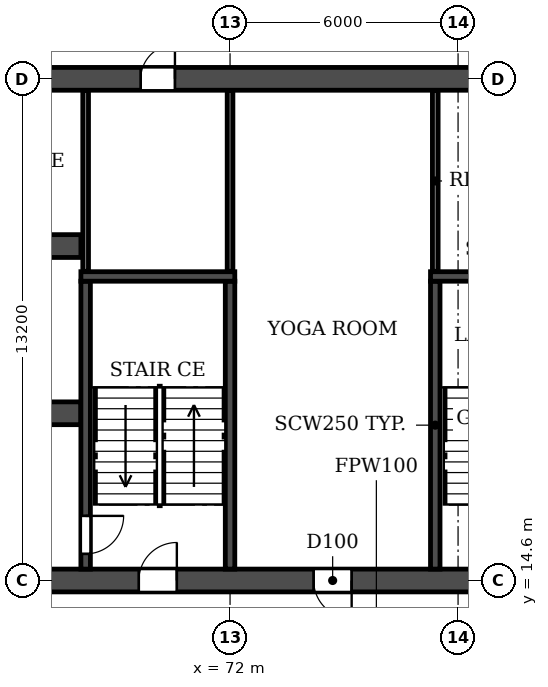
"""IFC4 building model, lengths in metres.
Left out: names, types, materials, properties, quantities, classifications, styles, units other than length and angle.
Written with IfcOpenShell. Run it as: python <this file> out.ifc"""

import sys

from ifc_helpers import new_model, si_unit, direction, frame, frame_2d, origin, place, context, subcontext, project, spatial, rectangle, extrude, element, fill, save


model = new_model("IFC4")
c1 = context("Model", 3, precision=1e-05, world=origin(), true_north=direction((0.0, 1.0)))
c2 = subcontext(c1, "Body", "Model", "MODEL_VIEW")
j1 = project(units=[si_unit("LENGTHUNIT", "METRE"), si_unit("PLANEANGLEUNIT", "RADIAN")], contexts=[c1])
p1 = place(None, origin())
s1 = spatial("IfcSite", under=j1, at=p1, CompositionType="ELEMENT")
p2 = place(p1, origin())
s2 = spatial("IfcBuilding", under=s1, at=p2, CompositionType="ELEMENT")
p3 = place(p2, frame((0.0, 0.0, 43.2)))
s3 = spatial("IfcBuildingStorey", under=s2, at=p3, CompositionType="ELEMENT", Elevation=43.2)
p4 = place(p3, frame((2.6, 14.6, 0.0), z_axis=(0.0, 0.0, 1.0), x_axis=(1.0, 0.0, 0.0)))
e1 = element("IfcWall", 1, at=p4, inside=s3, PredefinedType="SOLIDWALL", context=c2, shape_type="SweptSolid", body=[
    extrude(rectangle(XDim=96.8, YDim=0.6, at=frame_2d((48.4, 0.0))), origin(), (0.0, 0.0, 1.0), 3.05),
])
p5 = place(p4, frame((3.05, 0.0, 0.0)))
e2 = element("IfcOpeningElement", 2, at=p5, cuts=e1, PredefinedType="OPENING", context=c2, shape_type="SweptSolid", body=[
    extrude(rectangle(XDim=1.5, YDim=2.1, at=frame_2d((0.75, 1.05))), frame((0.0, 0.31, 0.0), z_axis=(0.0, -1.0, 0.0), x_axis=(1.0, 0.0, 0.0)), (0.0, 0.0, 1.0), 0.62),
])
p6 = place(p4, frame((10.75, 0.0, 0.0)))
e3 = element("IfcOpeningElement", 3, at=p6, cuts=e1, PredefinedType="OPENING", context=c2, shape_type="SweptSolid", body=[
    extrude(rectangle(XDim=1.5, YDim=2.1, at=frame_2d((0.75, 1.05))), frame((0.0, 0.31, 0.0), z_axis=(0.0, -1.0, 0.0), x_axis=(1.0, 0.0, 0.0)), (0.0, 0.0, 1.0), 0.62),
])
p7 = place(p4, frame((16.3, 0.0, 0.0)))
e4 = element("IfcOpeningElement", 4, at=p7, cuts=e1, PredefinedType="OPENING", context=c2, shape_type="SweptSolid", body=[
    extrude(rectangle(XDim=1.0, YDim=2.1, at=frame_2d((0.5, 1.05))), frame((0.0, 0.31, 0.0), z_axis=(0.0, -1.0, 0.0), x_axis=(1.0, 0.0, 0.0)), (0.0, 0.0, 1.0), 0.62),
])
p8 = place(p4, frame((24.2, 0.0, 0.0)))
e5 = element("IfcOpeningElement", 5, at=p8, cuts=e1, PredefinedType="OPENING", context=c2, shape_type="SweptSolid", body=[
    extrude(rectangle(XDim=1.0, YDim=2.1, at=frame_2d((0.5, 1.05))), frame((0.0, 0.31, 0.0), z_axis=(0.0, -1.0, 0.0), x_axis=(1.0, 0.0, 0.0)), (0.0, 0.0, 1.0), 0.62),
])
p9 = place(p4, frame((28.8, 0.0, 0.0)))
e6 = element("IfcOpeningElement", 6, at=p9, cuts=e1, PredefinedType="OPENING", context=c2, shape_type="SweptSolid", body=[
    extrude(rectangle(XDim=1.0, YDim=2.1, at=frame_2d((0.5, 1.05))), frame((0.0, 0.31, 0.0), z_axis=(0.0, -1.0, 0.0), x_axis=(1.0, 0.0, 0.0)), (0.0, 0.0, 1.0), 0.62),
])
p10 = place(p4, frame((42.7, 0.0, 0.0)))
e7 = element("IfcOpeningElement", 7, at=p10, cuts=e1, PredefinedType="OPENING", context=c2, shape_type="SweptSolid", body=[
    extrude(rectangle(XDim=1.0, YDim=2.1, at=frame_2d((0.5, 1.05))), frame((0.0, 0.31, 0.0), z_axis=(0.0, -1.0, 0.0), x_axis=(1.0, 0.0, 0.0)), (0.0, 0.0, 1.0), 0.62),
])
p11 = place(p4, frame((47.9, 0.0, 0.0)))
e8 = element("IfcOpeningElement", 8, at=p11, cuts=e1, PredefinedType="OPENING", context=c2, shape_type="SweptSolid", body=[
    extrude(rectangle(XDim=1.0, YDim=2.1, at=frame_2d((0.5, 1.05))), frame((0.0, 0.31, 0.0), z_axis=(0.0, -1.0, 0.0), x_axis=(1.0, 0.0, 0.0)), (0.0, 0.0, 1.0), 0.62),
])
p12 = place(p4, frame((51.8, 0.0, 0.0)))
e9 = element("IfcOpeningElement", 9, at=p12, cuts=e1, PredefinedType="OPENING", context=c2, shape_type="SweptSolid", body=[
    extrude(rectangle(XDim=1.0, YDim=2.1, at=frame_2d((0.5, 1.05))), frame((0.0, 0.31, 0.0), z_axis=(0.0, -1.0, 0.0), x_axis=(1.0, 0.0, 0.0)), (0.0, 0.0, 1.0), 0.62),
])
p13 = place(p4, frame((55.7, 0.0, 0.0)))
e10 = element("IfcOpeningElement", 10, at=p13, cuts=e1, PredefinedType="OPENING", context=c2, shape_type="SweptSolid", body=[
    extrude(rectangle(XDim=1.0, YDim=2.1, at=frame_2d((0.5, 1.05))), frame((0.0, 0.31, 0.0), z_axis=(0.0, -1.0, 0.0), x_axis=(1.0, 0.0, 0.0)), (0.0, 0.0, 1.0), 0.62),
])
p14 = place(p4, frame((67.0, 0.0, 0.0)))
e11 = element("IfcOpeningElement", 11, at=p14, cuts=e1, PredefinedType="OPENING", context=c2, shape_type="SweptSolid", body=[
    extrude(rectangle(XDim=1.0, YDim=2.1, at=frame_2d((0.5, 1.05))), frame((0.0, 0.31, 0.0), z_axis=(0.0, -1.0, 0.0), x_axis=(1.0, 0.0, 0.0)), (0.0, 0.0, 1.0), 0.62),
])
p15 = place(p4, frame((71.6, 0.0, 0.0)))
e12 = element("IfcOpeningElement", 12, at=p15, cuts=e1, PredefinedType="OPENING", context=c2, shape_type="SweptSolid", body=[
    extrude(rectangle(XDim=1.0, YDim=2.1, at=frame_2d((0.5, 1.05))), frame((0.0, 0.31, 0.0), z_axis=(0.0, -1.0, 0.0), x_axis=(1.0, 0.0, 0.0)), (0.0, 0.0, 1.0), 0.62),
])
p16 = place(p4, frame((79.5, 0.0, 0.0)))
e13 = element("IfcOpeningElement", 13, at=p16, cuts=e1, PredefinedType="OPENING", context=c2, shape_type="SweptSolid", body=[
    extrude(rectangle(XDim=1.0, YDim=2.1, at=frame_2d((0.5, 1.05))), frame((0.0, 0.31, 0.0), z_axis=(0.0, -1.0, 0.0), x_axis=(1.0, 0.0, 0.0)), (0.0, 0.0, 1.0), 0.62),
])
p17 = place(p4, frame((84.05, 0.0, 0.0)))
e14 = element("IfcOpeningElement", 14, at=p17, cuts=e1, PredefinedType="OPENING", context=c2, shape_type="SweptSolid", body=[
    extrude(rectangle(XDim=1.0, YDim=2.1, at=frame_2d((0.5, 1.05))), frame((0.0, 0.31, 0.0), z_axis=(0.0, -1.0, 0.0), x_axis=(1.0, 0.0, 0.0)), (0.0, 0.0, 1.0), 0.62),
])
p18 = place(p4, frame((91.75, 0.0, 0.0)))
e15 = element("IfcOpeningElement", 15, at=p18, cuts=e1, PredefinedType="OPENING", context=c2, shape_type="SweptSolid", body=[
    extrude(rectangle(XDim=1.0, YDim=2.1, at=frame_2d((0.5, 1.05))), frame((0.0, 0.31, 0.0), z_axis=(0.0, -1.0, 0.0), x_axis=(1.0, 0.0, 0.0)), (0.0, 0.0, 1.0), 0.62),
])
p19 = place(p3, frame((2.6, 27.8, 0.0), z_axis=(0.0, 0.0, 1.0), x_axis=(1.0, 0.0, 0.0)))
e16 = element("IfcWall", 16, at=p19, inside=s3, PredefinedType="SOLIDWALL", context=c2, shape_type="SweptSolid", body=[
    extrude(rectangle(XDim=96.8, YDim=0.6, at=frame_2d((48.4, 0.0))), origin(), (0.0, 0.0, 1.0), 3.05),
])
p20 = place(p19, frame((7.2, 0.0, 0.0)))
e17 = element("IfcOpeningElement", 17, at=p20, cuts=e16, PredefinedType="OPENING", context=c2, shape_type="SweptSolid", body=[
    extrude(rectangle(XDim=1.0, YDim=2.1, at=frame_2d((0.5, 1.05))), frame((0.0, 0.31, 0.0), z_axis=(0.0, -1.0, 0.0), x_axis=(1.0, 0.0, 0.0)), (0.0, 0.0, 1.0), 0.62),
])
p21 = place(p19, frame((16.3, 0.0, 0.0)))
e18 = element("IfcOpeningElement", 18, at=p21, cuts=e16, PredefinedType="OPENING", context=c2, shape_type="SweptSolid", body=[
    extrude(rectangle(XDim=1.0, YDim=2.1, at=frame_2d((0.5, 1.05))), frame((0.0, 0.31, 0.0), z_axis=(0.0, -1.0, 0.0), x_axis=(1.0, 0.0, 0.0)), (0.0, 0.0, 1.0), 0.62),
])
p22 = place(p19, frame((19.65, 0.0, 0.0)))
e19 = element("IfcOpeningElement", 19, at=p22, cuts=e16, PredefinedType="OPENING", context=c2, shape_type="SweptSolid", body=[
    extrude(rectangle(XDim=0.9, YDim=2.1, at=frame_2d((0.45, 1.05))), frame((0.0, 0.31, 0.0), z_axis=(0.0, -1.0, 0.0), x_axis=(1.0, 0.0, 0.0)), (0.0, 0.0, 1.0), 0.62),
])
p23 = place(p19, frame((28.85, 0.0, 0.0)))
e20 = element("IfcOpeningElement", 20, at=p23, cuts=e16, PredefinedType="OPENING", context=c2, shape_type="SweptSolid", body=[
    extrude(rectangle(XDim=0.9, YDim=2.1, at=frame_2d((0.45, 1.05))), frame((0.0, 0.31, 0.0), z_axis=(0.0, -1.0, 0.0), x_axis=(1.0, 0.0, 0.0)), (0.0, 0.0, 1.0), 0.62),
])
p24 = place(p19, frame((33.3, 0.0, 0.0)))
e21 = element("IfcOpeningElement", 21, at=p24, cuts=e16, PredefinedType="OPENING", context=c2, shape_type="SweptSolid", body=[
    extrude(rectangle(XDim=1.0, YDim=2.1, at=frame_2d((0.5, 1.05))), frame((0.0, 0.31, 0.0), z_axis=(0.0, -1.0, 0.0), x_axis=(1.0, 0.0, 0.0)), (0.0, 0.0, 1.0), 0.62),
])
p25 = place(p19, frame((38.25, 0.0, 0.0)))
e22 = element("IfcOpeningElement", 22, at=p25, cuts=e16, PredefinedType="OPENING", context=c2, shape_type="SweptSolid", body=[
    extrude(rectangle(XDim=1.5, YDim=2.1, at=frame_2d((0.75, 1.05))), frame((0.0, 0.31, 0.0), z_axis=(0.0, -1.0, 0.0), x_axis=(1.0, 0.0, 0.0)), (0.0, 0.0, 1.0), 0.62),
])
p26 = place(p19, frame((45.0, 0.0, 0.0)))
e23 = element("IfcOpeningElement", 23, at=p26, cuts=e16, PredefinedType="OPENING", context=c2, shape_type="SweptSolid", body=[
    extrude(rectangle(XDim=1.0, YDim=2.1, at=frame_2d((0.5, 1.05))), frame((0.0, 0.31, 0.0), z_axis=(0.0, -1.0, 0.0), x_axis=(1.0, 0.0, 0.0)), (0.0, 0.0, 1.0), 0.62),
])
p27 = place(p19, frame((47.9, 0.0, 0.0)))
e24 = element("IfcOpeningElement", 24, at=p27, cuts=e16, PredefinedType="OPENING", context=c2, shape_type="SweptSolid", body=[
    extrude(rectangle(XDim=1.0, YDim=2.1, at=frame_2d((0.5, 1.05))), frame((0.0, 0.31, 0.0), z_axis=(0.0, -1.0, 0.0), x_axis=(1.0, 0.0, 0.0)), (0.0, 0.0, 1.0), 0.62),
])
p28 = place(p19, frame((52.1, 0.0, 0.0)))
e25 = element("IfcOpeningElement", 25, at=p28, cuts=e16, PredefinedType="OPENING", context=c2, shape_type="SweptSolid", body=[
    extrude(rectangle(XDim=1.0, YDim=2.1, at=frame_2d((0.5, 1.05))), frame((0.0, 0.31, 0.0), z_axis=(0.0, -1.0, 0.0), x_axis=(1.0, 0.0, 0.0)), (0.0, 0.0, 1.0), 0.62),
])
p29 = place(p19, frame((56.0, 0.0, 0.0)))
e26 = element("IfcOpeningElement", 26, at=p29, cuts=e16, PredefinedType="OPENING", context=c2, shape_type="SweptSolid", body=[
    extrude(rectangle(XDim=1.0, YDim=2.1, at=frame_2d((0.5, 1.05))), frame((0.0, 0.31, 0.0), z_axis=(0.0, -1.0, 0.0), x_axis=(1.0, 0.0, 0.0)), (0.0, 0.0, 1.0), 0.62),
])
p30 = place(p19, frame((61.2, 0.0, 0.0)))
e27 = element("IfcOpeningElement", 27, at=p30, cuts=e16, PredefinedType="OPENING", context=c2, shape_type="SweptSolid", body=[
    extrude(rectangle(XDim=1.0, YDim=2.1, at=frame_2d((0.5, 1.05))), frame((0.0, 0.31, 0.0), z_axis=(0.0, -1.0, 0.0), x_axis=(1.0, 0.0, 0.0)), (0.0, 0.0, 1.0), 0.62),
])
p31 = place(p19, frame((67.05, 0.0, 0.0)))
e28 = element("IfcOpeningElement", 28, at=p31, cuts=e16, PredefinedType="OPENING", context=c2, shape_type="SweptSolid", body=[
    extrude(rectangle(XDim=0.9, YDim=2.1, at=frame_2d((0.45, 1.05))), frame((0.0, 0.31, 0.0), z_axis=(0.0, -1.0, 0.0), x_axis=(1.0, 0.0, 0.0)), (0.0, 0.0, 1.0), 0.62),
])
p32 = place(p19, frame((76.25, 0.0, 0.0)))
e29 = element("IfcOpeningElement", 29, at=p32, cuts=e16, PredefinedType="OPENING", context=c2, shape_type="SweptSolid", body=[
    extrude(rectangle(XDim=0.9, YDim=2.1, at=frame_2d((0.45, 1.05))), frame((0.0, 0.31, 0.0), z_axis=(0.0, -1.0, 0.0), x_axis=(1.0, 0.0, 0.0)), (0.0, 0.0, 1.0), 0.62),
])
p33 = place(p19, frame((79.5, 0.0, 0.0)))
e30 = element("IfcOpeningElement", 30, at=p33, cuts=e16, PredefinedType="OPENING", context=c2, shape_type="SweptSolid", body=[
    extrude(rectangle(XDim=1.0, YDim=2.1, at=frame_2d((0.5, 1.05))), frame((0.0, 0.31, 0.0), z_axis=(0.0, -1.0, 0.0), x_axis=(1.0, 0.0, 0.0)), (0.0, 0.0, 1.0), 0.62),
])
p34 = place(p19, frame((84.05, 0.0, 0.0)))
e31 = element("IfcOpeningElement", 31, at=p34, cuts=e16, PredefinedType="OPENING", context=c2, shape_type="SweptSolid", body=[
    extrude(rectangle(XDim=1.0, YDim=2.1, at=frame_2d((0.5, 1.05))), frame((0.0, 0.31, 0.0), z_axis=(0.0, -1.0, 0.0), x_axis=(1.0, 0.0, 0.0)), (0.0, 0.0, 1.0), 0.62),
])
p35 = place(p19, frame((91.75, 0.0, 0.0)))
e32 = element("IfcOpeningElement", 32, at=p35, cuts=e16, PredefinedType="OPENING", context=c2, shape_type="SweptSolid", body=[
    extrude(rectangle(XDim=1.0, YDim=2.1, at=frame_2d((0.5, 1.05))), frame((0.0, 0.31, 0.0), z_axis=(0.0, -1.0, 0.0), x_axis=(1.0, 0.0, 0.0)), (0.0, 0.0, 1.0), 0.62),
])
p36 = place(p3, frame((33.925, 19.0, 0.0), z_axis=(0.0, 0.0, 1.0), x_axis=(1.0, 0.0, 0.0)))
e33 = element("IfcWall", 33, at=p36, inside=s3, PredefinedType="SOLIDWALL", context=c2, shape_type="SweptSolid", body=[
    extrude(rectangle(XDim=34.15, YDim=0.6, at=frame_2d((17.075, 0.0))), origin(), (0.0, 0.0, 1.0), 3.05),
])
p37 = place(p36, frame((16.175, 0.0, 0.0)))
e34 = element("IfcOpeningElement", 34, at=p37, cuts=e33, PredefinedType="OPENING", context=c2, shape_type="SweptSolid", body=[
    extrude(rectangle(XDim=1.8, YDim=2.1, at=frame_2d((0.9, 1.05))), frame((0.0, 0.31, 0.0), z_axis=(0.0, -1.0, 0.0), x_axis=(1.0, 0.0, 0.0)), (0.0, 0.0, 1.0), 0.62),
])
p38 = place(p36, frame((1.525, 0.0, 0.0)))
e35 = element("IfcOpeningElement", 35, at=p38, cuts=e33, PredefinedType="OPENING", context=c2, shape_type="SweptSolid", body=[
    extrude(rectangle(XDim=1.8, YDim=2.1, at=frame_2d((0.9, 1.05))), frame((0.0, 0.31, 0.0), z_axis=(0.0, -1.0, 0.0), x_axis=(1.0, 0.0, 0.0)), (0.0, 0.0, 1.0), 0.62),
])
p39 = place(p36, frame((8.725, 0.0, 0.0)))
e36 = element("IfcOpeningElement", 36, at=p39, cuts=e33, PredefinedType="OPENING", context=c2, shape_type="SweptSolid", body=[
    extrude(rectangle(XDim=1.1, YDim=2.1, at=frame_2d((0.55, 1.05))), frame((0.0, 0.31, 0.0), z_axis=(0.0, -1.0, 0.0), x_axis=(1.0, 0.0, 0.0)), (0.0, 0.0, 1.0), 0.62),
])
p40 = place(p36, frame((11.325, 0.0, 0.0)))
e37 = element("IfcOpeningElement", 37, at=p40, cuts=e33, PredefinedType="OPENING", context=c2, shape_type="SweptSolid", body=[
    extrude(rectangle(XDim=1.1, YDim=2.1, at=frame_2d((0.55, 1.05))), frame((0.0, 0.31, 0.0), z_axis=(0.0, -1.0, 0.0), x_axis=(1.0, 0.0, 0.0)), (0.0, 0.0, 1.0), 0.62),
])
p41 = place(p36, frame((13.925, 0.0, 0.0)))
e38 = element("IfcOpeningElement", 38, at=p41, cuts=e33, PredefinedType="OPENING", context=c2, shape_type="SweptSolid", body=[
    extrude(rectangle(XDim=1.1, YDim=2.1, at=frame_2d((0.55, 1.05))), frame((0.0, 0.31, 0.0), z_axis=(0.0, -1.0, 0.0), x_axis=(1.0, 0.0, 0.0)), (0.0, 0.0, 1.0), 0.62),
])
p42 = place(p36, frame((19.125, 0.0, 0.0)))
e39 = element("IfcOpeningElement", 39, at=p42, cuts=e33, PredefinedType="OPENING", context=c2, shape_type="SweptSolid", body=[
    extrude(rectangle(XDim=1.1, YDim=2.1, at=frame_2d((0.55, 1.05))), frame((0.0, 0.31, 0.0), z_axis=(0.0, -1.0, 0.0), x_axis=(1.0, 0.0, 0.0)), (0.0, 0.0, 1.0), 0.62),
])
p43 = place(p36, frame((21.725, 0.0, 0.0)))
e40 = element("IfcOpeningElement", 40, at=p43, cuts=e33, PredefinedType="OPENING", context=c2, shape_type="SweptSolid", body=[
    extrude(rectangle(XDim=1.1, YDim=2.1, at=frame_2d((0.55, 1.05))), frame((0.0, 0.31, 0.0), z_axis=(0.0, -1.0, 0.0), x_axis=(1.0, 0.0, 0.0)), (0.0, 0.0, 1.0), 0.62),
])
p44 = place(p36, frame((24.325, 0.0, 0.0)))
e41 = element("IfcOpeningElement", 41, at=p44, cuts=e33, PredefinedType="OPENING", context=c2, shape_type="SweptSolid", body=[
    extrude(rectangle(XDim=1.1, YDim=2.1, at=frame_2d((0.55, 1.05))), frame((0.0, 0.31, 0.0), z_axis=(0.0, -1.0, 0.0), x_axis=(1.0, 0.0, 0.0)), (0.0, 0.0, 1.0), 0.62),
])
p45 = place(p36, frame((30.825, 0.0, 0.0)))
e42 = element("IfcOpeningElement", 42, at=p45, cuts=e33, PredefinedType="OPENING", context=c2, shape_type="SweptSolid", body=[
    extrude(rectangle(XDim=1.8, YDim=2.1, at=frame_2d((0.9, 1.05))), frame((0.0, 0.31, 0.0), z_axis=(0.0, -1.0, 0.0), x_axis=(1.0, 0.0, 0.0)), (0.0, 0.0, 1.0), 0.62),
])
p46 = place(p3, frame((33.925, 23.4, 0.0), z_axis=(0.0, 0.0, 1.0), x_axis=(1.0, 0.0, 0.0)))
e43 = element("IfcWall", 43, at=p46, inside=s3, PredefinedType="SOLIDWALL", context=c2, shape_type="SweptSolid", body=[
    extrude(rectangle(XDim=34.15, YDim=0.6, at=frame_2d((17.075, 0.0))), origin(), (0.0, 0.0, 1.0), 3.05),
])
p47 = place(p46, frame((16.175, 0.0, 0.0)))
e44 = element("IfcOpeningElement", 44, at=p47, cuts=e43, PredefinedType="OPENING", context=c2, shape_type="SweptSolid", body=[
    extrude(rectangle(XDim=1.8, YDim=2.1, at=frame_2d((0.9, 1.05))), frame((0.0, 0.31, 0.0), z_axis=(0.0, -1.0, 0.0), x_axis=(1.0, 0.0, 0.0)), (0.0, 0.0, 1.0), 0.62),
])
p48 = place(p46, frame((11.025, 0.0, 0.0)))
e45 = element("IfcOpeningElement", 45, at=p48, cuts=e43, PredefinedType="OPENING", context=c2, shape_type="SweptSolid", body=[
    extrude(rectangle(XDim=1.1, YDim=2.1, at=frame_2d((0.55, 1.05))), frame((0.0, 0.31, 0.0), z_axis=(0.0, -1.0, 0.0), x_axis=(1.0, 0.0, 0.0)), (0.0, 0.0, 1.0), 0.62),
])
p49 = place(p3, frame((68.2, 14.9, 0.0), z_axis=(0.0, 0.0, 1.0), x_axis=(0.0, 1.0, 0.0)))
e46 = element("IfcWall", 46, at=p49, inside=s3, PredefinedType="SOLIDWALL", context=c2, shape_type="SweptSolid", body=[
    extrude(rectangle(XDim=7.575, YDim=0.25, at=frame_2d((3.788, 0.0))), origin(), (0.0, 0.0, 1.0), 3.05),
])
p50 = place(p49, frame((0.4, 0.0, 0.0)))
e47 = element("IfcOpeningElement", 47, at=p50, cuts=e46, PredefinedType="OPENING", context=c2, shape_type="SweptSolid", body=[
    extrude(rectangle(XDim=1.0, YDim=2.1, at=frame_2d((0.5, 1.05))), frame((0.0, 0.135, 0.0), z_axis=(0.0, -1.0, 0.0), x_axis=(1.0, 0.0, 0.0)), (0.0, 0.0, 1.0), 0.27),
])
p51 = place(p3, frame((72.0, 14.9, 0.0), z_axis=(0.0, 0.0, 1.0), x_axis=(0.0, 1.0, 0.0)))
e48 = element("IfcWall", 48, at=p51, inside=s3, PredefinedType="SOLIDWALL", context=c2, shape_type="SweptSolid", body=[
    extrude(rectangle(XDim=7.575, YDim=0.25, at=frame_2d((3.788, 0.0))), origin(), (0.0, 0.0, 1.0), 3.05),
])
p52 = place(p3, frame((68.075, 22.6, 0.0), z_axis=(0.0, 0.0, 1.0), x_axis=(1.0, 0.0, 0.0)))
e49 = element("IfcWall", 49, at=p52, inside=s3, PredefinedType="SOLIDWALL", context=c2, shape_type="SweptSolid", body=[
    extrude(rectangle(XDim=4.05, YDim=0.25, at=frame_2d((2.025, 0.0))), origin(), (0.0, 0.0, 1.0), 3.05),
])
p53 = place(p3, frame((77.4, 14.9, 0.0), z_axis=(0.0, 0.0, 1.0), x_axis=(0.0, 1.0, 0.0)))
e50 = element("IfcWall", 50, at=p53, inside=s3, PredefinedType="SOLIDWALL", context=c2, shape_type="SweptSolid", body=[
    extrude(rectangle(XDim=7.575, YDim=0.25, at=frame_2d((3.788, 0.0))), origin(), (0.0, 0.0, 1.0), 3.05),
])
p54 = place(p3, frame((77.275, 22.6, 0.0), z_axis=(0.0, 0.0, 1.0), x_axis=(1.0, 0.0, 0.0)))
e51 = element("IfcWall", 51, at=p54, inside=s3, PredefinedType="SOLIDWALL", context=c2, shape_type="SweptSolid", body=[
    extrude(rectangle(XDim=4.05, YDim=0.25, at=frame_2d((2.025, 0.0))), origin(), (0.0, 0.0, 1.0), 3.05),
])
for number, where, z_axis, x_axis in (
    (52, (68.2, 22.735, 0.0), (0.0, 0.0, 1.0), (0.0, 1.0, 0.0)),
    (53, (72.0, 22.735, 0.0), (0.0, 0.0, 1.0), (0.0, 1.0, 0.0)),
    (54, (77.4, 22.735, 0.0), (0.0, 0.0, 1.0), (0.0, 1.0, 0.0)),
):
    element("IfcWall", number, at=place(p3, frame(where, z_axis=z_axis, x_axis=x_axis)), inside=s3, PredefinedType="PARTITIONING", context=c2, shape_type="SweptSolid", body=[
        extrude(rectangle(XDim=4.755, YDim=0.15, at=frame_2d((2.377, 0.0))), origin(), (0.0, 0.0, 1.0), 3.05),
    ])
p55 = place(p31, origin())
e55 = element("IfcDoor", 55, at=p55, inside=s3, OperationType="SINGLE_SWING_RIGHT", PredefinedType="DOOR", context=c2, shape_type="SweptSolid", body=[
    extrude(rectangle(XDim=0.9, YDim=2.1, at=frame_2d((0.45, 1.05))), frame((0.0, 0.025, 0.0), z_axis=(0.0, -1.0, 0.0), x_axis=(1.0, 0.0, 0.0)), (0.0, 0.0, 1.0), 0.05),
])
fill(e28, e55)
p56 = place(p14, origin())
e56 = element("IfcDoor", 56, at=p56, inside=s3, OperationType="SINGLE_SWING_RIGHT", PredefinedType="DOOR", context=c2, shape_type="SweptSolid", body=[
    extrude(rectangle(XDim=1.0, YDim=2.1, at=frame_2d((0.5, 1.05))), frame((0.0, 0.025, 0.0), z_axis=(0.0, -1.0, 0.0), x_axis=(1.0, 0.0, 0.0)), (0.0, 0.0, 1.0), 0.05),
])
fill(e11, e56)
p57 = place(p15, frame((1.0, 0.0, 0.0), z_axis=(0.0, 0.0, 1.0), x_axis=(-1.0, 0.0, 0.0)))
e57 = element("IfcDoor", 57, at=p57, inside=s3, OperationType="SINGLE_SWING_LEFT", PredefinedType="DOOR", context=c2, shape_type="SweptSolid", body=[
    extrude(rectangle(XDim=1.0, YDim=2.1, at=frame_2d((0.5, 1.05))), frame((0.0, 0.025, 0.0), z_axis=(0.0, -1.0, 0.0), x_axis=(1.0, 0.0, 0.0)), (0.0, 0.0, 1.0), 0.05),
])
fill(e12, e57)
p58 = place(p50, frame((1.0, 0.0, 0.0), z_axis=(0.0, 0.0, 1.0), x_axis=(-1.0, 0.0, 0.0)))
e58 = element("IfcDoor", 58, at=p58, inside=s3, OperationType="SINGLE_SWING_LEFT", PredefinedType="DOOR", context=c2, shape_type="SweptSolid", body=[
    extrude(rectangle(XDim=1.0, YDim=2.1, at=frame_2d((0.5, 1.05))), frame((0.0, 0.025, 0.0), z_axis=(0.0, -1.0, 0.0), x_axis=(1.0, 0.0, 0.0)), (0.0, 0.0, 1.0), 0.05),
])
fill(e47, e58)
save(model, sys.argv[1])
